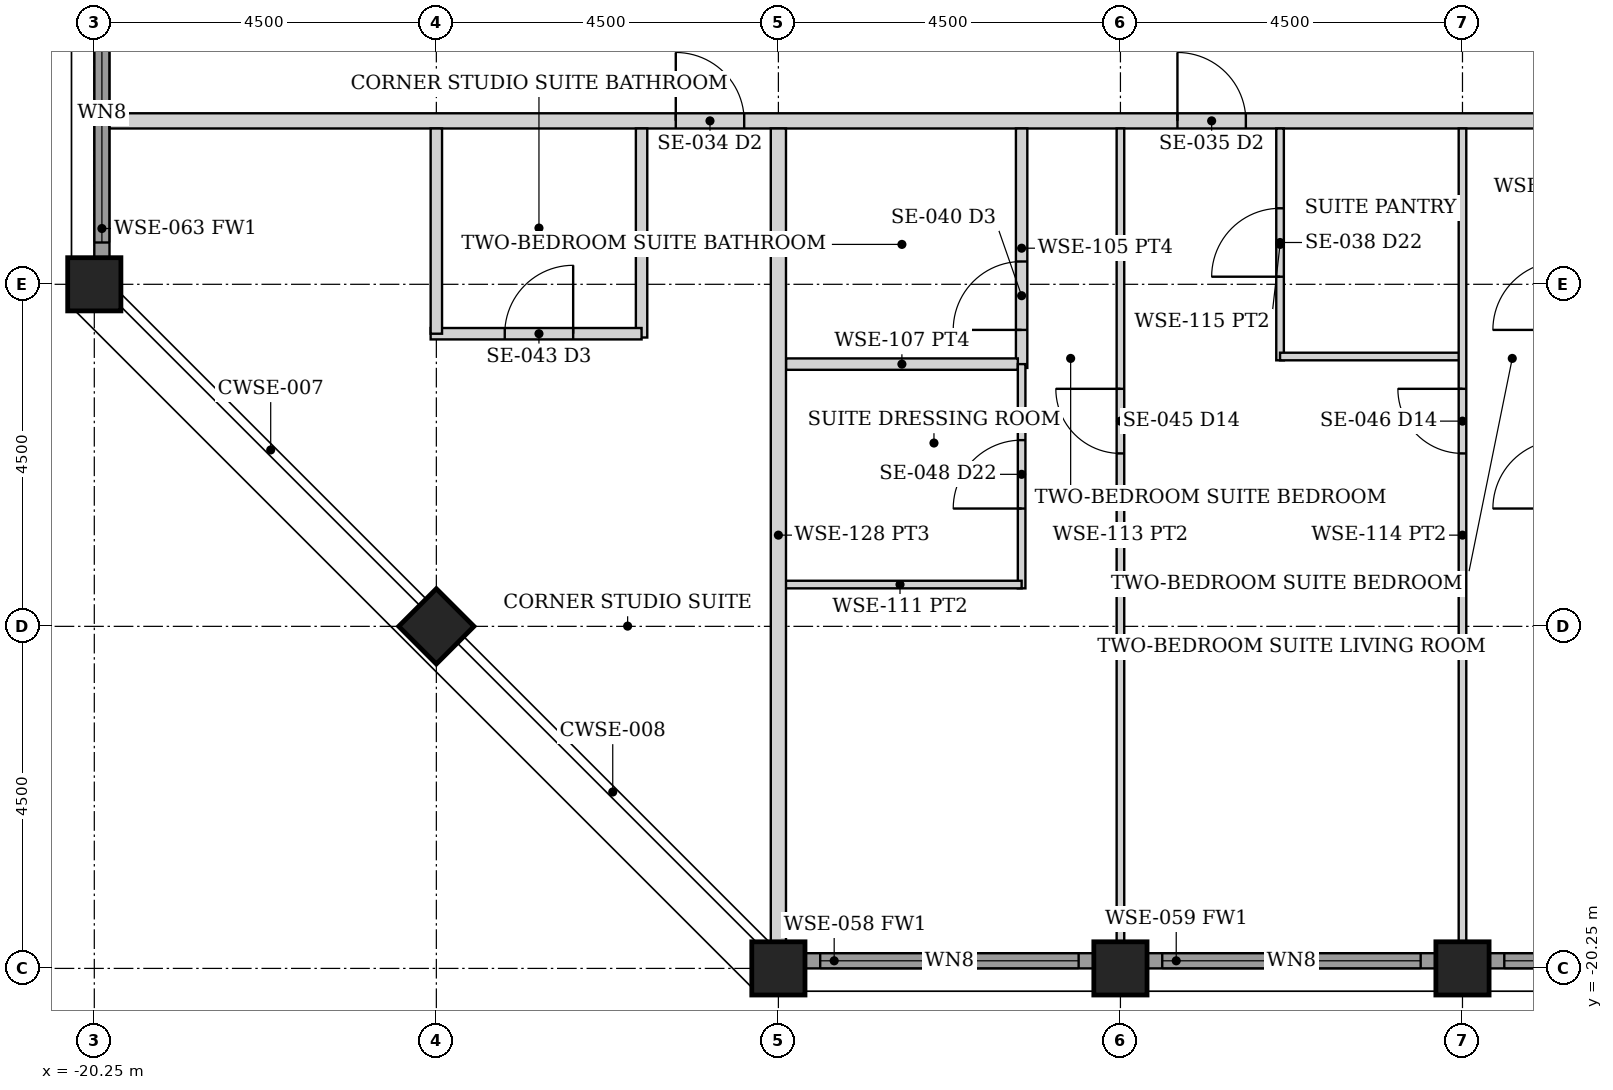
"""IFC4 building model, lengths in metres.
Left out: names, types, materials, properties, quantities, classifications, styles, units other than length and angle.
Written with IfcOpenShell. Run it as: python <this file> out.ifc"""

import sys

from ifc_helpers import new_model, si_unit, direction, frame, frame_2d, origin, origin_2d, place, context, subcontext, project, spatial, rectangle, hollow_rectangle, extrude, element, fill, save


model = new_model("IFC4")
c1 = context("Model", 3, precision=1e-05, world=origin(), true_north=direction((0.0, 1.0)))
c2 = subcontext(c1, "Body", "Model", "MODEL_VIEW")
j1 = project(units=[si_unit("LENGTHUNIT", "METRE"), si_unit("PLANEANGLEUNIT", "RADIAN")], contexts=[c1])
p1 = place(None, origin())
s1 = spatial("IfcSite", under=j1, at=p1, CompositionType="ELEMENT")
p2 = place(p1, origin())
s2 = spatial("IfcBuilding", under=s1, at=p2, CompositionType="ELEMENT")
p3 = place(p2, frame((0.0, 0.0, 253.3)))
s3 = spatial("IfcBuildingStorey", under=s2, at=p3, CompositionType="ELEMENT", Elevation=253.3)
for number, where, z_axis, x_axis in (
    (1, (-11.25, -20.25, 0.0), (0.0, 0.0, 1.0), (0.0, 1.0, 0.0)),
    (2, (-20.25, -11.25, 0.0), (0.0, 0.0, 1.0), (1.0, 0.0, 0.0)),
    (3, (-6.75, -20.25, 0.0), (0.0, 0.0, 1.0), (0.0, 1.0, 0.0)),
    (4, (-2.25, -20.25, 0.0), (0.0, 0.0, 1.0), (0.0, 1.0, 0.0)),
    (5, (-15.75, -15.75, 0.0), (0.0, 0.0, 1.0), (0.707, 0.707, 0.0)),
):
    element("IfcColumn", number, at=place(p3, frame(where, z_axis=z_axis, x_axis=x_axis)), inside=s3, PredefinedType="COLUMN", context=c2, shape_type="SweptSolid", body=[
        extrude(hollow_rectangle(XDim=0.7, YDim=0.7, WallThickness=0.035, at=origin_2d()), origin(), (0.0, 0.0, 1.0), 3.75),
    ])
p4 = place(p3, frame((-10.895, -20.15, 0.0), z_axis=(0.0, 0.0, 1.0), x_axis=(1.0, 0.0, 0.0)))
e6 = element("IfcWall", 6, at=p4, inside=s3, PredefinedType="SOLIDWALL", context=c2, shape_type="SweptSolid", body=[
    extrude(rectangle(XDim=3.79, YDim=0.2, at=frame_2d((1.895, 0.0))), origin(), (0.0, 0.0, 1.0), 2.579),
])
p5 = place(p4, frame((0.195, 0.0, 0.3)))
e7 = element("IfcOpeningElement", 7, at=p5, cuts=e6, PredefinedType="OPENING", context=c2, shape_type="SweptSolid", body=[
    extrude(rectangle(XDim=3.4, YDim=2.129, at=frame_2d((1.7, 1.064))), frame((0.0, 0.11, 0.0), z_axis=(0.0, -1.0, 0.0), x_axis=(1.0, 0.0, 0.0)), (0.0, 0.0, 1.0), 0.22),
])
p6 = place(p3, frame((-6.395, -20.15, 0.0), z_axis=(0.0, 0.0, 1.0), x_axis=(1.0, 0.0, 0.0)))
e8 = element("IfcWall", 8, at=p6, inside=s3, PredefinedType="SOLIDWALL", context=c2, shape_type="SweptSolid", body=[
    extrude(rectangle(XDim=3.79, YDim=0.2, at=frame_2d((1.895, 0.0))), origin(), (0.0, 0.0, 1.0), 2.579),
])
p7 = place(p6, frame((0.195, 0.0, 0.3)))
e9 = element("IfcOpeningElement", 9, at=p7, cuts=e8, PredefinedType="OPENING", context=c2, shape_type="SweptSolid", body=[
    extrude(rectangle(XDim=3.4, YDim=2.129, at=frame_2d((1.7, 1.064))), frame((0.0, 0.11, 0.0), z_axis=(0.0, -1.0, 0.0), x_axis=(1.0, 0.0, 0.0)), (0.0, 0.0, 1.0), 0.22),
])
p8 = place(p3, frame((-1.895, -20.15, 0.0), z_axis=(0.0, 0.0, 1.0), x_axis=(1.0, 0.0, 0.0)))
e10 = element("IfcWall", 10, at=p8, inside=s3, PredefinedType="SOLIDWALL", context=c2, shape_type="SweptSolid", body=[
    extrude(rectangle(XDim=3.79, YDim=0.2, at=frame_2d((1.895, 0.0))), origin(), (0.0, 0.0, 1.0), 2.579),
])
p9 = place(p8, frame((0.195, 0.0, 0.3)))
e11 = element("IfcOpeningElement", 11, at=p9, cuts=e10, PredefinedType="OPENING", context=c2, shape_type="SweptSolid", body=[
    extrude(rectangle(XDim=3.4, YDim=2.129, at=frame_2d((1.7, 1.064))), frame((0.0, 0.11, 0.0), z_axis=(0.0, -1.0, 0.0), x_axis=(1.0, 0.0, 0.0)), (0.0, 0.0, 1.0), 0.22),
])
p10 = place(p3, frame((-20.15, -10.895, 0.0), z_axis=(0.0, 0.0, 1.0), x_axis=(0.0, 1.0, 0.0)))
e12 = element("IfcWall", 12, at=p10, inside=s3, PredefinedType="SOLIDWALL", context=c2, shape_type="SweptSolid", body=[
    extrude(rectangle(XDim=3.79, YDim=0.2, at=frame_2d((1.895, 0.0))), origin(), (0.0, 0.0, 1.0), 2.579),
])
p11 = place(p10, frame((0.195, 0.0, 0.3)))
e13 = element("IfcOpeningElement", 13, at=p11, cuts=e12, PredefinedType="OPENING", context=c2, shape_type="SweptSolid", body=[
    extrude(rectangle(XDim=3.4, YDim=2.129, at=frame_2d((1.7, 1.064))), frame((0.0, 0.11, 0.0), z_axis=(0.0, -1.0, 0.0), x_axis=(1.0, 0.0, 0.0)), (0.0, 0.0, 1.0), 0.22),
])
p12 = place(p3, frame((-20.05, -9.1, 0.0), z_axis=(0.0, 0.0, 1.0), x_axis=(1.0, 0.0, 0.0)))
e14 = element("IfcWall", 14, at=p12, inside=s3, PredefinedType="PARTITIONING", context=c2, shape_type="SweptSolid", body=[
    extrude(rectangle(XDim=40.1, YDim=0.2, at=frame_2d((20.05, 0.0))), origin(), (0.0, 0.0, 1.0), 2.573),
])
p13 = place(p12, frame((14.05, 0.0, 0.0)))
e15 = element("IfcOpeningElement", 15, at=p13, cuts=e14, PredefinedType="OPENING", context=c2, shape_type="SweptSolid", body=[
    extrude(rectangle(XDim=0.9, YDim=2.1, at=frame_2d((0.45, 1.05))), frame((0.0, 0.11, 0.0), z_axis=(0.0, -1.0, 0.0), x_axis=(1.0, 0.0, 0.0)), (0.0, 0.0, 1.0), 0.22),
])
p14 = place(p12, frame((23.05, 0.0, 0.0)))
e16 = element("IfcOpeningElement", 16, at=p14, cuts=e14, PredefinedType="OPENING", context=c2, shape_type="SweptSolid", body=[
    extrude(rectangle(XDim=0.9, YDim=2.1, at=frame_2d((0.45, 1.05))), frame((0.0, 0.11, 0.0), z_axis=(0.0, -1.0, 0.0), x_axis=(1.0, 0.0, 0.0)), (0.0, 0.0, 1.0), 0.22),
])
p15 = place(p12, frame((31.75, 0.0, 0.0)))
e17 = element("IfcOpeningElement", 17, at=p15, cuts=e14, PredefinedType="OPENING", context=c2, shape_type="SweptSolid", body=[
    extrude(rectangle(XDim=0.9, YDim=2.1, at=frame_2d((0.45, 1.05))), frame((0.0, 0.11, 0.0), z_axis=(0.0, -1.0, 0.0), x_axis=(1.0, 0.0, 0.0)), (0.0, 0.0, 1.0), 0.22),
])
p16 = place(p12, frame((7.45, 0.0, 0.0)))
e18 = element("IfcOpeningElement", 18, at=p16, cuts=e14, PredefinedType="OPENING", context=c2, shape_type="SweptSolid", body=[
    extrude(rectangle(XDim=0.9, YDim=2.1, at=frame_2d((0.45, 1.05))), frame((0.0, 0.11, 0.0), z_axis=(0.0, -1.0, 0.0), x_axis=(1.0, 0.0, 0.0)), (0.0, 0.0, 1.0), 0.22),
])
p17 = place(p3, frame((-4.65, -12.25, 0.0), z_axis=(0.0, 0.0, 1.0), x_axis=(0.0, 1.0, 0.0)))
e19 = element("IfcWall", 19, at=p17, inside=s3, PredefinedType="PARTITIONING", context=c2, shape_type="SweptSolid", body=[
    extrude(rectangle(XDim=3.05, YDim=0.1, at=frame_2d((1.525, 0.0))), origin(), (0.0, 0.0, 1.0), 2.573),
])
p18 = place(p17, frame((1.1, 0.0, 0.0)))
e20 = element("IfcOpeningElement", 20, at=p18, cuts=e19, PredefinedType="OPENING", context=c2, shape_type="SweptSolid", body=[
    extrude(rectangle(XDim=0.9, YDim=2.1, at=frame_2d((0.45, 1.05))), frame((0.0, 0.06, 0.0), z_axis=(0.0, -1.0, 0.0), x_axis=(1.0, 0.0, 0.0)), (0.0, 0.0, 1.0), 0.12),
])
p19 = place(p3, frame((-4.65, -12.2, 0.0), z_axis=(0.0, 0.0, 1.0), x_axis=(1.0, 0.0, 0.0)))
e21 = element("IfcWall", 21, at=p19, inside=s3, PredefinedType="PARTITIONING", context=c2, shape_type="SweptSolid", body=[
    extrude(rectangle(XDim=2.4, YDim=0.1, at=frame_2d((1.2, 0.0))), origin(), (0.0, 0.0, 1.0), 2.573),
])
p20 = place(p3, frame((-6.75, -19.9, 0.0), z_axis=(0.0, 0.0, 1.0), x_axis=(0.0, 1.0, 0.0)))
e22 = element("IfcWall", 22, at=p20, inside=s3, PredefinedType="PARTITIONING", context=c2, shape_type="SweptSolid", body=[
    extrude(rectangle(XDim=10.7, YDim=0.1, at=frame_2d((5.35, 0.0))), origin(), (0.0, 0.0, 1.0), 2.573),
])
p21 = place(p20, frame((6.425, 0.0, 0.0)))
e23 = element("IfcOpeningElement", 23, at=p21, cuts=e22, PredefinedType="OPENING", context=c2, shape_type="SweptSolid", body=[
    extrude(rectangle(XDim=0.85, YDim=2.1, at=frame_2d((0.425, 1.05))), frame((0.0, 0.06, 0.0), z_axis=(0.0, -1.0, 0.0), x_axis=(1.0, 0.0, 0.0)), (0.0, 0.0, 1.0), 0.12),
])
p22 = place(p3, frame((-8.05, -12.35, 0.0), z_axis=(0.0, 0.0, 1.0), x_axis=(0.0, 1.0, 0.0)))
e24 = element("IfcWall", 24, at=p22, inside=s3, PredefinedType="PARTITIONING", context=c2, shape_type="SweptSolid", body=[
    extrude(rectangle(XDim=3.15, YDim=0.15, at=frame_2d((1.575, 0.0))), origin(), (0.0, 0.0, 1.0), 2.573),
])
p23 = place(p22, frame((0.5, 0.0, 0.0)))
e25 = element("IfcOpeningElement", 25, at=p23, cuts=e24, PredefinedType="OPENING", context=c2, shape_type="SweptSolid", body=[
    extrude(rectangle(XDim=0.9, YDim=2.1, at=frame_2d((0.45, 1.05))), frame((0.0, 0.085, 0.0), z_axis=(0.0, -1.0, 0.0), x_axis=(1.0, 0.0, 0.0)), (0.0, 0.0, 1.0), 0.17),
])
p24 = place(p3, frame((-11.15, -12.3, 0.0), z_axis=(0.0, 0.0, 1.0), x_axis=(1.0, 0.0, 0.0)))
e26 = element("IfcWall", 26, at=p24, inside=s3, PredefinedType="PARTITIONING", context=c2, shape_type="SweptSolid", body=[
    extrude(rectangle(XDim=3.05, YDim=0.15, at=frame_2d((1.525, 0.0))), origin(), (0.0, 0.0, 1.0), 2.573),
])
p25 = place(p3, frame((-8.05, -15.25, 0.0), z_axis=(0.0, 0.0, 1.0), x_axis=(0.0, 1.0, 0.0)))
e27 = element("IfcWall", 27, at=p25, inside=s3, PredefinedType="PARTITIONING", context=c2, shape_type="SweptSolid", body=[
    extrude(rectangle(XDim=2.95, YDim=0.1, at=frame_2d((1.475, 0.0))), origin(), (0.0, 0.0, 1.0), 2.573),
])
p26 = place(p25, frame((1.05, 0.0, 0.0)))
e28 = element("IfcOpeningElement", 28, at=p26, cuts=e27, PredefinedType="OPENING", context=c2, shape_type="SweptSolid", body=[
    extrude(rectangle(XDim=0.9, YDim=2.1, at=frame_2d((0.45, 1.05))), frame((0.0, 0.06, 0.0), z_axis=(0.0, -1.0, 0.0), x_axis=(1.0, 0.0, 0.0)), (0.0, 0.0, 1.0), 0.12),
])
p27 = place(p3, frame((-11.25, -15.2, 0.0), z_axis=(0.0, 0.0, 1.0), x_axis=(1.0, 0.0, 0.0)))
e29 = element("IfcWall", 29, at=p27, inside=s3, PredefinedType="PARTITIONING", context=c2, shape_type="SweptSolid", body=[
    extrude(rectangle(XDim=3.2, YDim=0.1, at=frame_2d((1.6, 0.0))), origin(), (0.0, 0.0, 1.0), 2.573),
])
p28 = place(p3, frame((-2.25, -19.9, 0.0), z_axis=(0.0, 0.0, 1.0), x_axis=(0.0, 1.0, 0.0)))
e30 = element("IfcWall", 30, at=p28, inside=s3, PredefinedType="PARTITIONING", context=c2, shape_type="SweptSolid", body=[
    extrude(rectangle(XDim=10.7, YDim=0.1, at=frame_2d((5.35, 0.0))), origin(), (0.0, 0.0, 1.0), 2.573),
])
p29 = place(p28, frame((6.425, 0.0, 0.0)))
e31 = element("IfcOpeningElement", 31, at=p29, cuts=e30, PredefinedType="OPENING", context=c2, shape_type="SweptSolid", body=[
    extrude(rectangle(XDim=0.85, YDim=2.1, at=frame_2d((0.425, 1.05))), frame((0.0, 0.06, 0.0), z_axis=(0.0, -1.0, 0.0), x_axis=(1.0, 0.0, 0.0)), (0.0, 0.0, 1.0), 0.12),
])
p30 = place(p3, frame((-11.25, -19.9, 0.0), z_axis=(0.0, 0.0, 1.0), x_axis=(0.0, 1.0, 0.0)))
e32 = element("IfcWall", 32, at=p30, inside=s3, PredefinedType="PARTITIONING", context=c2, shape_type="SweptSolid", body=[
    extrude(rectangle(XDim=10.7, YDim=0.2, at=frame_2d((5.35, 0.0))), origin(), (0.0, 0.0, 1.0), 2.573),
])
p31 = place(p3, frame((-13.05, -11.95, 0.0), z_axis=(0.0, 0.0, 1.0), x_axis=(0.0, 1.0, 0.0)))
e33 = element("IfcWall", 33, at=p31, inside=s3, PredefinedType="PARTITIONING", context=c2, shape_type="SweptSolid", body=[
    extrude(rectangle(XDim=2.75, YDim=0.15, at=frame_2d((1.375, 0.0))), origin(), (0.0, 0.0, 1.0), 2.573),
])
p32 = place(p3, frame((-15.825, -11.9, 0.0), z_axis=(0.0, 0.0, 1.0), x_axis=(1.0, 0.0, 0.0)))
e34 = element("IfcWall", 34, at=p32, inside=s3, PredefinedType="PARTITIONING", context=c2, shape_type="SweptSolid", body=[
    extrude(rectangle(XDim=2.775, YDim=0.15, at=frame_2d((1.387, 0.0))), origin(), (0.0, 0.0, 1.0), 2.573),
])
p33 = place(p32, frame((0.975, 0.0, 0.0)))
e35 = element("IfcOpeningElement", 35, at=p33, cuts=e34, PredefinedType="OPENING", context=c2, shape_type="SweptSolid", body=[
    extrude(rectangle(XDim=0.9, YDim=2.1, at=frame_2d((0.45, 1.05))), frame((0.0, 0.085, 0.0), z_axis=(0.0, -1.0, 0.0), x_axis=(1.0, 0.0, 0.0)), (0.0, 0.0, 1.0), 0.17),
])
p34 = place(p3, frame((-15.75, -11.9, 0.0), z_axis=(0.0, 0.0, 1.0), x_axis=(0.0, 1.0, 0.0)))
e36 = element("IfcWall", 36, at=p34, inside=s3, PredefinedType="PARTITIONING", context=c2, shape_type="SweptSolid", body=[
    extrude(rectangle(XDim=2.7, YDim=0.15, at=frame_2d((1.35, 0.0))), origin(), (0.0, 0.0, 1.0), 2.573),
])
p35 = place(p5, origin())
e37 = element("IfcWindow", 37, at=p35, inside=s3, PartitioningType="SINGLE_PANEL", PredefinedType="WINDOW", context=c2, shape_type="SweptSolid", body=[
    extrude(rectangle(XDim=3.4, YDim=2.129, at=frame_2d((1.7, 1.064))), frame((0.0, 0.03, 0.0), z_axis=(0.0, -1.0, 0.0), x_axis=(1.0, 0.0, 0.0)), (0.0, 0.0, 1.0), 0.06),
])
fill(e7, e37)
p36 = place(p7, origin())
e38 = element("IfcWindow", 38, at=p36, inside=s3, PartitioningType="SINGLE_PANEL", PredefinedType="WINDOW", context=c2, shape_type="SweptSolid", body=[
    extrude(rectangle(XDim=3.4, YDim=2.129, at=frame_2d((1.7, 1.064))), frame((0.0, 0.03, 0.0), z_axis=(0.0, -1.0, 0.0), x_axis=(1.0, 0.0, 0.0)), (0.0, 0.0, 1.0), 0.06),
])
fill(e9, e38)
p37 = place(p9, origin())
e39 = element("IfcWindow", 39, at=p37, inside=s3, PartitioningType="SINGLE_PANEL", PredefinedType="WINDOW", context=c2, shape_type="SweptSolid", body=[
    extrude(rectangle(XDim=3.4, YDim=2.129, at=frame_2d((1.7, 1.064))), frame((0.0, 0.03, 0.0), z_axis=(0.0, -1.0, 0.0), x_axis=(1.0, 0.0, 0.0)), (0.0, 0.0, 1.0), 0.06),
])
fill(e11, e39)
p38 = place(p11, origin())
e40 = element("IfcWindow", 40, at=p38, inside=s3, PartitioningType="SINGLE_PANEL", PredefinedType="WINDOW", context=c2, shape_type="SweptSolid", body=[
    extrude(rectangle(XDim=3.4, YDim=2.129, at=frame_2d((1.7, 1.064))), frame((0.0, 0.03, 0.0), z_axis=(0.0, -1.0, 0.0), x_axis=(1.0, 0.0, 0.0)), (0.0, 0.0, 1.0), 0.06),
])
fill(e13, e40)
p39 = place(p13, origin())
e41 = element("IfcDoor", 41, at=p39, inside=s3, OperationType="SINGLE_SWING_LEFT", PredefinedType="DOOR", context=c2, shape_type="SweptSolid", body=[
    extrude(rectangle(XDim=0.9, YDim=2.1, at=frame_2d((0.45, 1.05))), frame((0.0, 0.025, 0.0), z_axis=(0.0, -1.0, 0.0), x_axis=(1.0, 0.0, 0.0)), (0.0, 0.0, 1.0), 0.05),
])
fill(e15, e41)
p40 = place(p18, origin())
e42 = element("IfcDoor", 42, at=p40, inside=s3, OperationType="SINGLE_SWING_LEFT", PredefinedType="DOOR", context=c2, shape_type="SweptSolid", body=[
    extrude(rectangle(XDim=0.9, YDim=2.1, at=frame_2d((0.45, 1.05))), frame((0.0, 0.025, 0.0), z_axis=(0.0, -1.0, 0.0), x_axis=(1.0, 0.0, 0.0)), (0.0, 0.0, 1.0), 0.05),
])
fill(e20, e42)
p41 = place(p26, origin())
e43 = element("IfcDoor", 43, at=p41, inside=s3, OperationType="SINGLE_SWING_LEFT", PredefinedType="DOOR", context=c2, shape_type="SweptSolid", body=[
    extrude(rectangle(XDim=0.9, YDim=2.1, at=frame_2d((0.45, 1.05))), frame((0.0, 0.025, 0.0), z_axis=(0.0, -1.0, 0.0), x_axis=(1.0, 0.0, 0.0)), (0.0, 0.0, 1.0), 0.05),
])
fill(e28, e43)
p42 = place(p21, origin())
e44 = element("IfcDoor", 44, at=p42, inside=s3, OperationType="SINGLE_SWING_RIGHT", PredefinedType="DOOR", context=c2, shape_type="SweptSolid", body=[
    extrude(rectangle(XDim=0.85, YDim=2.1, at=frame_2d((0.425, 1.05))), frame((0.0, 0.025, 0.0), z_axis=(0.0, -1.0, 0.0), x_axis=(1.0, 0.0, 0.0)), (0.0, 0.0, 1.0), 0.05),
])
fill(e23, e44)
p43 = place(p23, origin())
e45 = element("IfcDoor", 45, at=p43, inside=s3, OperationType="SINGLE_SWING_LEFT", PredefinedType="DOOR", context=c2, shape_type="SweptSolid", body=[
    extrude(rectangle(XDim=0.9, YDim=2.1, at=frame_2d((0.45, 1.05))), frame((0.0, 0.025, 0.0), z_axis=(0.0, -1.0, 0.0), x_axis=(1.0, 0.0, 0.0)), (0.0, 0.0, 1.0), 0.05),
])
fill(e25, e45)
p44 = place(p29, origin())
e46 = element("IfcDoor", 46, at=p44, inside=s3, OperationType="SINGLE_SWING_RIGHT", PredefinedType="DOOR", context=c2, shape_type="SweptSolid", body=[
    extrude(rectangle(XDim=0.85, YDim=2.1, at=frame_2d((0.425, 1.05))), frame((0.0, 0.025, 0.0), z_axis=(0.0, -1.0, 0.0), x_axis=(1.0, 0.0, 0.0)), (0.0, 0.0, 1.0), 0.05),
])
fill(e31, e46)
p45 = place(p16, origin())
e47 = element("IfcDoor", 47, at=p45, inside=s3, OperationType="SINGLE_SWING_LEFT", PredefinedType="DOOR", context=c2, shape_type="SweptSolid", body=[
    extrude(rectangle(XDim=0.9, YDim=2.1, at=frame_2d((0.45, 1.05))), frame((0.0, 0.025, 0.0), z_axis=(0.0, -1.0, 0.0), x_axis=(1.0, 0.0, 0.0)), (0.0, 0.0, 1.0), 0.05),
])
fill(e18, e47)
p46 = place(p33, origin())
e48 = element("IfcDoor", 48, at=p46, inside=s3, OperationType="SINGLE_SWING_RIGHT", PredefinedType="DOOR", context=c2, shape_type="SweptSolid", body=[
    extrude(rectangle(XDim=0.9, YDim=2.1, at=frame_2d((0.45, 1.05))), frame((0.0, 0.025, 0.0), z_axis=(0.0, -1.0, 0.0), x_axis=(1.0, 0.0, 0.0)), (0.0, 0.0, 1.0), 0.05),
])
fill(e35, e48)
save(model, sys.argv[1])
